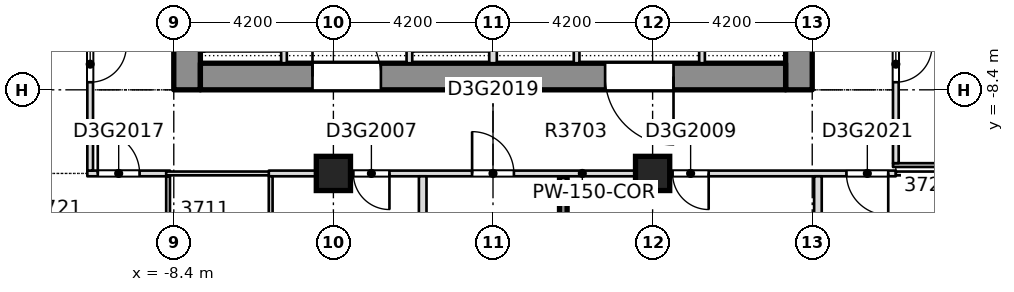
"""IFC4 building model, lengths in metres.
Left out: names, types, materials, properties, quantities, classifications, styles, units other than length and angle.
Written with IfcOpenShell. Run it as: python <this file> out.ifc"""

import sys

from ifc_helpers import new_model, si_unit, direction, frame, frame_2d, origin, origin_2d, place, context, subcontext, project, spatial, rectangle, extrude, element, fill, save


model = new_model("IFC4")
c1 = context("Model", 3, precision=1e-05, world=origin(), true_north=direction((0.0, 1.0)))
c2 = subcontext(c1, "Body", "Model", "MODEL_VIEW")
j1 = project(units=[si_unit("LENGTHUNIT", "METRE"), si_unit("PLANEANGLEUNIT", "RADIAN")], contexts=[c1])
p1 = place(None, origin())
s1 = spatial("IfcSite", under=j1, at=p1, CompositionType="ELEMENT")
p2 = place(p1, origin())
s2 = spatial("IfcBuilding", under=s1, at=p2, CompositionType="ELEMENT")
p3 = place(p2, frame((0.0, 0.0, 146.9)))
s3 = spatial("IfcBuildingStorey", under=s2, at=p3, CompositionType="ELEMENT", Elevation=146.9)
p4 = place(p3, frame((8.05, -8.4, -0.4), z_axis=(0.0, 0.0, 1.0), x_axis=(0.0, 1.0, 0.0)))
e1 = element("IfcWall", 1, at=p4, inside=s3, PredefinedType="SOLIDWALL", context=c2, shape_type="SweptSolid", body=[
    extrude(rectangle(XDim=30.15, YDim=0.7, at=frame_2d((15.075, 0.0))), origin(), (0.0, 0.0, 1.0), 3.45),
])
p5 = place(p4, frame((19.3, 0.0, 0.4)))
e2 = element("IfcOpeningElement", 2, at=p5, cuts=e1, PredefinedType="OPENING", context=c2, shape_type="SweptSolid", body=[
    extrude(rectangle(XDim=1.2, YDim=2.1, at=frame_2d((0.6, 1.05))), frame((0.0, 0.36, 0.0), z_axis=(0.0, -1.0, 0.0), x_axis=(1.0, 0.0, 0.0)), (0.0, 0.0, 1.0), 0.72),
])
p6 = place(p3, frame((-8.05, -8.4, -0.4), z_axis=(0.0, 0.0, 1.0), x_axis=(0.0, 1.0, 0.0)))
e3 = element("IfcWall", 3, at=p6, inside=s3, PredefinedType="SOLIDWALL", context=c2, shape_type="SweptSolid", body=[
    extrude(rectangle(XDim=30.15, YDim=0.7, at=frame_2d((15.075, 0.0))), origin(), (0.0, 0.0, 1.0), 3.45),
])
p7 = place(p6, frame((19.3, 0.0, 0.4)))
e4 = element("IfcOpeningElement", 4, at=p7, cuts=e3, PredefinedType="OPENING", context=c2, shape_type="SweptSolid", body=[
    extrude(rectangle(XDim=1.2, YDim=2.1, at=frame_2d((0.6, 1.05))), frame((0.0, 0.36, 0.0), z_axis=(0.0, -1.0, 0.0), x_axis=(1.0, 0.0, 0.0)), (0.0, 0.0, 1.0), 0.72),
])
p8 = place(p3, frame((-7.7, -8.05, -0.4), z_axis=(0.0, 0.0, 1.0), x_axis=(1.0, 0.0, 0.0)))
e5 = element("IfcWall", 5, at=p8, inside=s3, PredefinedType="SHEAR", context=c2, shape_type="SweptSolid", body=[
    extrude(rectangle(XDim=15.4, YDim=0.7, at=frame_2d((7.7, 0.0))), origin(), (0.0, 0.0, 1.0), 3.45),
])
p9 = place(p8, frame((2.95, 0.0, 0.4)))
e6 = element("IfcOpeningElement", 6, at=p9, cuts=e5, PredefinedType="OPENING", context=c2, shape_type="SweptSolid", body=[
    extrude(rectangle(XDim=1.8, YDim=2.1, at=frame_2d((0.9, 1.05))), frame((0.0, 0.36, 0.0), z_axis=(0.0, -1.0, 0.0), x_axis=(1.0, 0.0, 0.0)), (0.0, 0.0, 1.0), 0.72),
])
p10 = place(p8, frame((10.65, 0.0, 0.4)))
e7 = element("IfcOpeningElement", 7, at=p10, cuts=e5, PredefinedType="OPENING", context=c2, shape_type="SweptSolid", body=[
    extrude(rectangle(XDim=1.8, YDim=2.1, at=frame_2d((0.9, 1.05))), frame((0.0, 0.36, 0.0), z_axis=(0.0, -1.0, 0.0), x_axis=(1.0, 0.0, 0.0)), (0.0, 0.0, 1.0), 0.72),
])
for number, where, z_axis, x_axis in (
    (8, (-4.2, -10.6, -0.4), (0.0, 0.0, 1.0), (1.0, 0.0, 0.0)),
    (9, (4.2, -10.6, -0.4), (0.0, 0.0, 1.0), (1.0, 0.0, 0.0)),
):
    element("IfcColumn", number, at=place(p3, frame(where, z_axis=z_axis, x_axis=x_axis)), inside=s3, PredefinedType="COLUMN", context=c2, shape_type="SweptSolid", body=[
        extrude(rectangle(XDim=0.9, YDim=0.9, at=origin_2d()), origin(), (0.0, 0.0, 1.0), 3.45),
    ])
p11 = place(p3, frame((-10.675, -10.6, 0.0), z_axis=(0.0, 0.0, 1.0), x_axis=(1.0, 0.0, 0.0)))
e10 = element("IfcWall", 10, at=p11, inside=s3, PredefinedType="PARTITIONING", context=c2, shape_type="SweptSolid", body=[
    extrude(rectangle(XDim=2.175, YDim=0.15, at=frame_2d((1.087, 0.0))), origin(), (0.0, 0.0, 1.0), 3.05),
])
p12 = place(p11, frame((0.275, 0.0, 0.0)))
e11 = element("IfcOpeningElement", 11, at=p12, cuts=e10, PredefinedType="OPENING", context=c2, shape_type="SweptSolid", body=[
    extrude(rectangle(XDim=1.1, YDim=2.1, at=frame_2d((0.55, 1.05))), frame((0.0, 0.085, 0.0), z_axis=(0.0, -1.0, 0.0), x_axis=(1.0, 0.0, 0.0)), (0.0, 0.0, 1.0), 0.17),
])
p13 = place(p3, frame((-8.6, -10.6, 0.0), z_axis=(0.0, 0.0, 1.0), x_axis=(1.0, 0.0, 0.0)))
e12 = element("IfcWall", 12, at=p13, inside=s3, PredefinedType="PARTITIONING", context=c2, shape_type="SweptSolid", body=[
    extrude(rectangle(XDim=2.8, YDim=0.1, at=frame_2d((1.4, 0.0))), origin(), (0.0, 0.0, 1.0), 3.05),
])
p14 = place(p3, frame((-5.9, -10.6, 0.0), z_axis=(0.0, 0.0, 1.0), x_axis=(1.0, 0.0, 0.0)))
e13 = element("IfcWall", 13, at=p14, inside=s3, PredefinedType="PARTITIONING", context=c2, shape_type="SweptSolid", body=[
    extrude(rectangle(XDim=16.5, YDim=0.15, at=frame_2d((8.25, 0.0))), origin(), (0.0, 0.0, 1.0), 3.05),
])
p15 = place(p14, frame((2.225, 0.0, 0.0)))
e14 = element("IfcOpeningElement", 14, at=p15, cuts=e13, PredefinedType="OPENING", context=c2, shape_type="SweptSolid", body=[
    extrude(rectangle(XDim=0.95, YDim=2.1, at=frame_2d((0.475, 1.05))), frame((0.0, 0.085, 0.0), z_axis=(0.0, -1.0, 0.0), x_axis=(1.0, 0.0, 0.0)), (0.0, 0.0, 1.0), 0.17),
])
p16 = place(p14, frame((10.625, 0.0, 0.0)))
e15 = element("IfcOpeningElement", 15, at=p16, cuts=e13, PredefinedType="OPENING", context=c2, shape_type="SweptSolid", body=[
    extrude(rectangle(XDim=0.95, YDim=2.1, at=frame_2d((0.475, 1.05))), frame((0.0, 0.085, 0.0), z_axis=(0.0, -1.0, 0.0), x_axis=(1.0, 0.0, 0.0)), (0.0, 0.0, 1.0), 0.17),
])
p17 = place(p14, frame((5.35, 0.0, 0.0)))
e16 = element("IfcOpeningElement", 16, at=p17, cuts=e13, PredefinedType="OPENING", context=c2, shape_type="SweptSolid", body=[
    extrude(rectangle(XDim=1.1, YDim=2.1, at=frame_2d((0.55, 1.05))), frame((0.0, 0.085, 0.0), z_axis=(0.0, -1.0, 0.0), x_axis=(1.0, 0.0, 0.0)), (0.0, 0.0, 1.0), 0.17),
])
p18 = place(p14, frame((15.2, 0.0, 0.0)))
e17 = element("IfcOpeningElement", 17, at=p18, cuts=e13, PredefinedType="OPENING", context=c2, shape_type="SweptSolid", body=[
    extrude(rectangle(XDim=1.1, YDim=2.1, at=frame_2d((0.55, 1.05))), frame((0.0, 0.085, 0.0), z_axis=(0.0, -1.0, 0.0), x_axis=(1.0, 0.0, 0.0)), (0.0, 0.0, 1.0), 0.17),
])
p19 = place(p3, frame((10.6, -10.6, 0.0), z_axis=(0.0, 0.0, 1.0), x_axis=(1.0, 0.0, 0.0)))
e18 = element("IfcWall", 18, at=p19, inside=s3, PredefinedType="PARTITIONING", context=c2, shape_type="SweptSolid", body=[
    extrude(rectangle(XDim=1.7, YDim=0.1, at=frame_2d((0.85, 0.0))), origin(), (0.0, 0.0, 1.0), 3.05),
])
p20 = place(p3, frame((10.525, -10.38, 0.0), z_axis=(0.0, 0.0, 1.0), x_axis=(1.0, 0.0, 0.0)))
e19 = element("IfcWall", 19, at=p20, inside=s3, PredefinedType="PARTITIONING", context=c2, shape_type="SweptSolid", body=[
    extrude(rectangle(XDim=2.925, YDim=0.1, at=frame_2d((1.462, 0.0))), origin(), (0.0, 0.0, 1.0), 3.05),
])
p21 = place(p3, frame((-10.6, -10.525, 0.0), z_axis=(0.0, 0.0, 1.0), x_axis=(0.0, 1.0, 0.0)))
e20 = element("IfcWall", 20, at=p21, inside=s3, PredefinedType="PARTITIONING", context=c2, shape_type="SweptSolid", body=[
    extrude(rectangle(XDim=13.875, YDim=0.15, at=frame_2d((6.938, 0.0))), origin(), (0.0, 0.0, 1.0), 3.05),
])
p22 = place(p21, frame((2.325, 0.0, 0.0)))
e21 = element("IfcOpeningElement", 21, at=p22, cuts=e20, PredefinedType="OPENING", context=c2, shape_type="SweptSolid", body=[
    extrude(rectangle(XDim=0.95, YDim=2.1, at=frame_2d((0.475, 1.05))), frame((0.0, 0.085, 0.0), z_axis=(0.0, -1.0, 0.0), x_axis=(1.0, 0.0, 0.0)), (0.0, 0.0, 1.0), 0.17),
])
p23 = place(p21, frame((9.975, 0.0, 0.0)))
e22 = element("IfcOpeningElement", 22, at=p23, cuts=e20, PredefinedType="OPENING", context=c2, shape_type="SweptSolid", body=[
    extrude(rectangle(XDim=1.1, YDim=2.1, at=frame_2d((0.55, 1.05))), frame((0.0, 0.085, 0.0), z_axis=(0.0, -1.0, 0.0), x_axis=(1.0, 0.0, 0.0)), (0.0, 0.0, 1.0), 0.17),
])
p24 = place(p21, frame((4.825, 0.0, 0.0)))
e23 = element("IfcOpeningElement", 23, at=p24, cuts=e20, PredefinedType="OPENING", context=c2, shape_type="SweptSolid", body=[
    extrude(rectangle(XDim=1.0, YDim=2.1, at=frame_2d((0.5, 1.05))), frame((0.0, 0.085, 0.0), z_axis=(0.0, -1.0, 0.0), x_axis=(1.0, 0.0, 0.0)), (0.0, 0.0, 1.0), 0.17),
])
p25 = place(p3, frame((-8.55, -13.25, 0.0), z_axis=(0.0, 0.0, 1.0), x_axis=(0.0, 1.0, 0.0)))
e24 = element("IfcWall", 24, at=p25, inside=s3, PredefinedType="PARTITIONING", context=c2, shape_type="SweptSolid", body=[
    extrude(rectangle(XDim=2.575, YDim=0.1, at=frame_2d((1.288, 0.0))), origin(), (0.0, 0.0, 1.0), 3.05),
])
p26 = place(p3, frame((-5.85, -13.248, 0.0), z_axis=(0.0, 0.0, 1.0), x_axis=(0.0, 1.0, 0.0)))
e25 = element("IfcWall", 25, at=p26, inside=s3, PredefinedType="PARTITIONING", context=c2, shape_type="SweptSolid", body=[
    extrude(rectangle(XDim=2.573, YDim=0.1, at=frame_2d((1.287, 0.0))), origin(), (0.0, 0.0, 1.0), 3.05),
])
for number, where, z_axis, x_axis in (
    (26, (-1.85, -12.998, 0.0), (0.0, 0.0, 1.0), (0.0, 1.0, 0.0)),
    (27, (8.55, -12.998, 0.0), (0.0, 0.0, 1.0), (0.0, 1.0, 0.0)),
):
    element("IfcWall", number, at=place(p3, frame(where, z_axis=z_axis, x_axis=x_axis)), inside=s3, PredefinedType="PARTITIONING", context=c2, shape_type="SweptSolid", body=[
        extrude(rectangle(XDim=2.323, YDim=0.2, at=frame_2d((1.162, 0.0))), origin(), (0.0, 0.0, 1.0), 3.05),
    ])
p27 = place(p3, frame((10.6, -10.33, 0.0), z_axis=(0.0, 0.0, 1.0), x_axis=(0.0, 1.0, 0.0)))
e28 = element("IfcWall", 28, at=p27, inside=s3, PredefinedType="PARTITIONING", context=c2, shape_type="SweptSolid", body=[
    extrude(rectangle(XDim=18.75, YDim=0.15, at=frame_2d((9.375, 0.0))), origin(), (0.0, 0.0, 1.0), 3.05),
])
p28 = place(p27, frame((2.13, 0.0, 0.0)))
e29 = element("IfcOpeningElement", 29, at=p28, cuts=e28, PredefinedType="OPENING", context=c2, shape_type="SweptSolid", body=[
    extrude(rectangle(XDim=0.95, YDim=2.1, at=frame_2d((0.475, 1.05))), frame((0.0, 0.085, 0.0), z_axis=(0.0, -1.0, 0.0), x_axis=(1.0, 0.0, 0.0)), (0.0, 0.0, 1.0), 0.17),
])
p29 = place(p27, frame((15.79, 0.0, 0.0)))
e30 = element("IfcOpeningElement", 30, at=p29, cuts=e28, PredefinedType="OPENING", context=c2, shape_type="SweptSolid", body=[
    extrude(rectangle(XDim=0.95, YDim=2.1, at=frame_2d((0.475, 1.05))), frame((0.0, 0.085, 0.0), z_axis=(0.0, -1.0, 0.0), x_axis=(1.0, 0.0, 0.0)), (0.0, 0.0, 1.0), 0.17),
])
p30 = place(p27, frame((9.78, 0.0, 0.0)))
e31 = element("IfcOpeningElement", 31, at=p30, cuts=e28, PredefinedType="OPENING", context=c2, shape_type="SweptSolid", body=[
    extrude(rectangle(XDim=1.1, YDim=2.1, at=frame_2d((0.55, 1.05))), frame((0.0, 0.085, 0.0), z_axis=(0.0, -1.0, 0.0), x_axis=(1.0, 0.0, 0.0)), (0.0, 0.0, 1.0), 0.17),
])
p31 = place(p27, frame((4.63, 0.0, 0.0)))
e32 = element("IfcOpeningElement", 32, at=p31, cuts=e28, PredefinedType="OPENING", context=c2, shape_type="SweptSolid", body=[
    extrude(rectangle(XDim=1.0, YDim=2.1, at=frame_2d((0.5, 1.05))), frame((0.0, 0.085, 0.0), z_axis=(0.0, -1.0, 0.0), x_axis=(1.0, 0.0, 0.0)), (0.0, 0.0, 1.0), 0.17),
])
p32 = place(p3, frame((-5.5, -7.699, 0.0), z_axis=(0.0, 0.0, 1.0), x_axis=(0.0, 1.0, 0.0)))
e33 = element("IfcWall", 33, at=p32, inside=s3, PredefinedType="PARTITIONING", context=c2, shape_type="SweptSolid", body=[
    extrude(rectangle(XDim=12.124, YDim=0.15, at=frame_2d((6.062, 0.0))), origin(), (0.0, 0.0, 1.0), 3.05),
])
p33 = place(p32, frame((1.149, 0.0, 0.0)))
e34 = element("IfcOpeningElement", 34, at=p33, cuts=e33, PredefinedType="OPENING", context=c2, shape_type="SweptSolid", body=[
    extrude(rectangle(XDim=1.1, YDim=2.1, at=frame_2d((0.55, 1.05))), frame((0.0, 0.085, 0.0), z_axis=(0.0, -1.0, 0.0), x_axis=(1.0, 0.0, 0.0)), (0.0, 0.0, 1.0), 0.17),
])
p34 = place(p32, frame((4.149, 0.0, 0.0)))
e35 = element("IfcOpeningElement", 35, at=p34, cuts=e33, PredefinedType="OPENING", context=c2, shape_type="SweptSolid", body=[
    extrude(rectangle(XDim=1.1, YDim=2.1, at=frame_2d((0.55, 1.05))), frame((0.0, 0.085, 0.0), z_axis=(0.0, -1.0, 0.0), x_axis=(1.0, 0.0, 0.0)), (0.0, 0.0, 1.0), 0.17),
])
p35 = place(p32, frame((7.149, 0.0, 0.0)))
e36 = element("IfcOpeningElement", 36, at=p35, cuts=e33, PredefinedType="OPENING", context=c2, shape_type="SweptSolid", body=[
    extrude(rectangle(XDim=1.1, YDim=2.1, at=frame_2d((0.55, 1.05))), frame((0.0, 0.085, 0.0), z_axis=(0.0, -1.0, 0.0), x_axis=(1.0, 0.0, 0.0)), (0.0, 0.0, 1.0), 0.17),
])
p36 = place(p32, frame((10.149, 0.0, 0.0)))
e37 = element("IfcOpeningElement", 37, at=p36, cuts=e33, PredefinedType="OPENING", context=c2, shape_type="SweptSolid", body=[
    extrude(rectangle(XDim=1.1, YDim=2.1, at=frame_2d((0.55, 1.05))), frame((0.0, 0.085, 0.0), z_axis=(0.0, -1.0, 0.0), x_axis=(1.0, 0.0, 0.0)), (0.0, 0.0, 1.0), 0.17),
])
p37 = place(p3, frame((-2.2, -7.699, 0.0), z_axis=(0.0, 0.0, 1.0), x_axis=(0.0, 1.0, 0.0)))
e38 = element("IfcWall", 38, at=p37, inside=s3, PredefinedType="PARTITIONING", context=c2, shape_type="SweptSolid", body=[
    extrude(rectangle(XDim=12.124, YDim=0.15, at=frame_2d((6.062, 0.0))), origin(), (0.0, 0.0, 1.0), 3.05),
])
p38 = place(p37, frame((1.149, 0.0, 0.0)))
e39 = element("IfcOpeningElement", 39, at=p38, cuts=e38, PredefinedType="OPENING", context=c2, shape_type="SweptSolid", body=[
    extrude(rectangle(XDim=1.1, YDim=2.1, at=frame_2d((0.55, 1.05))), frame((0.0, 0.085, 0.0), z_axis=(0.0, -1.0, 0.0), x_axis=(1.0, 0.0, 0.0)), (0.0, 0.0, 1.0), 0.17),
])
p39 = place(p37, frame((7.224, 0.0, 0.0)))
e40 = element("IfcOpeningElement", 40, at=p39, cuts=e38, PredefinedType="OPENING", context=c2, shape_type="SweptSolid", body=[
    extrude(rectangle(XDim=0.95, YDim=2.1, at=frame_2d((0.475, 1.05))), frame((0.0, 0.085, 0.0), z_axis=(0.0, -1.0, 0.0), x_axis=(1.0, 0.0, 0.0)), (0.0, 0.0, 1.0), 0.17),
])
p40 = place(p3, frame((0.0, -7.699, 0.0), z_axis=(0.0, 0.0, 1.0), x_axis=(0.0, 1.0, 0.0)))
e41 = element("IfcWall", 41, at=p40, inside=s3, PredefinedType="PARTITIONING", context=c2, shape_type="SweptSolid", body=[
    extrude(rectangle(XDim=12.124, YDim=0.2, at=frame_2d((6.062, 0.0))), origin(), (0.0, 0.0, 1.0), 3.05),
])
p41 = place(p3, frame((2.2, -7.699, 0.0), z_axis=(0.0, 0.0, 1.0), x_axis=(0.0, 1.0, 0.0)))
e42 = element("IfcWall", 42, at=p41, inside=s3, PredefinedType="PARTITIONING", context=c2, shape_type="SweptSolid", body=[
    extrude(rectangle(XDim=12.124, YDim=0.15, at=frame_2d((6.062, 0.0))), origin(), (0.0, 0.0, 1.0), 3.05),
])
p42 = place(p41, frame((2.724, 0.0, 0.0)))
e43 = element("IfcOpeningElement", 43, at=p42, cuts=e42, PredefinedType="OPENING", context=c2, shape_type="SweptSolid", body=[
    extrude(rectangle(XDim=0.95, YDim=2.1, at=frame_2d((0.475, 1.05))), frame((0.0, 0.085, 0.0), z_axis=(0.0, -1.0, 0.0), x_axis=(1.0, 0.0, 0.0)), (0.0, 0.0, 1.0), 0.17),
])
p43 = place(p41, frame((8.724, 0.0, 0.0)))
e44 = element("IfcOpeningElement", 44, at=p43, cuts=e42, PredefinedType="OPENING", context=c2, shape_type="SweptSolid", body=[
    extrude(rectangle(XDim=0.95, YDim=2.1, at=frame_2d((0.475, 1.05))), frame((0.0, 0.085, 0.0), z_axis=(0.0, -1.0, 0.0), x_axis=(1.0, 0.0, 0.0)), (0.0, 0.0, 1.0), 0.17),
])
p44 = place(p3, frame((5.5, -7.699, 0.0), z_axis=(0.0, 0.0, 1.0), x_axis=(0.0, 1.0, 0.0)))
e45 = element("IfcWall", 45, at=p44, inside=s3, PredefinedType="PARTITIONING", context=c2, shape_type="SweptSolid", body=[
    extrude(rectangle(XDim=12.124, YDim=0.15, at=frame_2d((6.062, 0.0))), origin(), (0.0, 0.0, 1.0), 3.05),
])
p45 = place(p44, frame((2.724, 0.0, 0.0)))
e46 = element("IfcOpeningElement", 46, at=p45, cuts=e45, PredefinedType="OPENING", context=c2, shape_type="SweptSolid", body=[
    extrude(rectangle(XDim=0.95, YDim=2.1, at=frame_2d((0.475, 1.05))), frame((0.0, 0.085, 0.0), z_axis=(0.0, -1.0, 0.0), x_axis=(1.0, 0.0, 0.0)), (0.0, 0.0, 1.0), 0.17),
])
p46 = place(p44, frame((8.724, 0.0, 0.0)))
e47 = element("IfcOpeningElement", 47, at=p46, cuts=e45, PredefinedType="OPENING", context=c2, shape_type="SweptSolid", body=[
    extrude(rectangle(XDim=0.95, YDim=2.1, at=frame_2d((0.475, 1.05))), frame((0.0, 0.085, 0.0), z_axis=(0.0, -1.0, 0.0), x_axis=(1.0, 0.0, 0.0)), (0.0, 0.0, 1.0), 0.17),
])
p47 = place(p3, frame((1.85, -21.55, 0.0), z_axis=(0.0, 0.0, 1.0), x_axis=(0.0, 1.0, 0.0)))
e48 = element("IfcWall", 48, at=p47, inside=s3, PredefinedType="SOLIDWALL", context=c2, shape_type="SweptSolid", body=[
    extrude(rectangle(XDim=10.875, YDim=0.2, at=frame_2d((5.438, 0.0))), origin(), (0.0, 0.0, 1.0), 3.05),
])
p48 = place(p22, origin())
e49 = element("IfcDoor", 49, at=p48, inside=s3, OperationType="SINGLE_SWING_RIGHT", PredefinedType="DOOR", context=c2, shape_type="SweptSolid", body=[
    extrude(rectangle(XDim=0.95, YDim=2.1, at=frame_2d((0.475, 1.05))), frame((0.0, 0.025, 0.0), z_axis=(0.0, -1.0, 0.0), x_axis=(1.0, 0.0, 0.0)), (0.0, 0.0, 1.0), 0.05),
])
fill(e21, e49)
p49 = place(p15, origin())
e50 = element("IfcDoor", 50, at=p49, inside=s3, OperationType="SINGLE_SWING_LEFT", PredefinedType="DOOR", context=c2, shape_type="SweptSolid", body=[
    extrude(rectangle(XDim=0.95, YDim=2.1, at=frame_2d((0.475, 1.05))), frame((0.0, 0.025, 0.0), z_axis=(0.0, -1.0, 0.0), x_axis=(1.0, 0.0, 0.0)), (0.0, 0.0, 1.0), 0.05),
])
fill(e14, e50)
p50 = place(p16, origin())
e51 = element("IfcDoor", 51, at=p50, inside=s3, OperationType="SINGLE_SWING_RIGHT", PredefinedType="DOOR", context=c2, shape_type="SweptSolid", body=[
    extrude(rectangle(XDim=0.95, YDim=2.1, at=frame_2d((0.475, 1.05))), frame((0.0, 0.025, 0.0), z_axis=(0.0, -1.0, 0.0), x_axis=(1.0, 0.0, 0.0)), (0.0, 0.0, 1.0), 0.05),
])
fill(e15, e51)
p51 = place(p28, origin())
e52 = element("IfcDoor", 52, at=p51, inside=s3, OperationType="SINGLE_SWING_LEFT", PredefinedType="DOOR", context=c2, shape_type="SweptSolid", body=[
    extrude(rectangle(XDim=0.95, YDim=2.1, at=frame_2d((0.475, 1.05))), frame((0.0, 0.025, 0.0), z_axis=(0.0, -1.0, 0.0), x_axis=(1.0, 0.0, 0.0)), (0.0, 0.0, 1.0), 0.05),
])
fill(e29, e52)
p52 = place(p12, origin())
e53 = element("IfcDoor", 53, at=p52, inside=s3, OperationType="SINGLE_SWING_RIGHT", PredefinedType="DOOR", context=c2, shape_type="SweptSolid", body=[
    extrude(rectangle(XDim=1.1, YDim=2.1, at=frame_2d((0.55, 1.05))), frame((0.0, 0.025, 0.0), z_axis=(0.0, -1.0, 0.0), x_axis=(1.0, 0.0, 0.0)), (0.0, 0.0, 1.0), 0.05),
])
fill(e11, e53)
p53 = place(p17, origin())
e54 = element("IfcDoor", 54, at=p53, inside=s3, OperationType="SINGLE_SWING_LEFT", PredefinedType="DOOR", context=c2, shape_type="SweptSolid", body=[
    extrude(rectangle(XDim=1.1, YDim=2.1, at=frame_2d((0.55, 1.05))), frame((0.0, 0.025, 0.0), z_axis=(0.0, -1.0, 0.0), x_axis=(1.0, 0.0, 0.0)), (0.0, 0.0, 1.0), 0.05),
])
fill(e16, e54)
p54 = place(p18, origin())
e55 = element("IfcDoor", 55, at=p54, inside=s3, OperationType="SINGLE_SWING_RIGHT", PredefinedType="DOOR", context=c2, shape_type="SweptSolid", body=[
    extrude(rectangle(XDim=1.1, YDim=2.1, at=frame_2d((0.55, 1.05))), frame((0.0, 0.025, 0.0), z_axis=(0.0, -1.0, 0.0), x_axis=(1.0, 0.0, 0.0)), (0.0, 0.0, 1.0), 0.05),
])
fill(e17, e55)
p55 = place(p9, origin())
e56 = element("IfcDoor", 56, at=p55, inside=s3, OperationType="SINGLE_SWING_LEFT", PredefinedType="DOOR", context=c2, shape_type="SweptSolid", body=[
    extrude(rectangle(XDim=1.8, YDim=2.1, at=frame_2d((0.9, 1.05))), frame((0.0, 0.025, 0.0), z_axis=(0.0, -1.0, 0.0), x_axis=(1.0, 0.0, 0.0)), (0.0, 0.0, 1.0), 0.05),
])
fill(e6, e56)
p56 = place(p10, origin())
e57 = element("IfcDoor", 57, at=p56, inside=s3, OperationType="SINGLE_SWING_LEFT", PredefinedType="DOOR", context=c2, shape_type="SweptSolid", body=[
    extrude(rectangle(XDim=1.8, YDim=2.1, at=frame_2d((0.9, 1.05))), frame((0.0, 0.025, 0.0), z_axis=(0.0, -1.0, 0.0), x_axis=(1.0, 0.0, 0.0)), (0.0, 0.0, 1.0), 0.05),
])
fill(e7, e57)
save(model, sys.argv[1])
